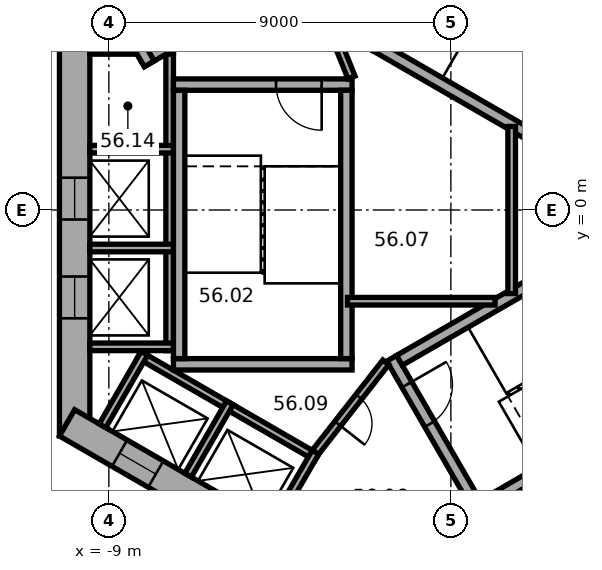
"""IFC4 building model, lengths in metres.
Left out: names, types, materials, properties, quantities, classifications, styles, units other than length and angle.
Written with IfcOpenShell. Run it as: python <this file> out.ifc"""

import sys

from ifc_helpers import new_model, si_unit, direction, frame, frame_2d, origin, place, context, subcontext, project, spatial, rectangle, extrude, element, fill, save


model = new_model("IFC4")
c1 = context("Model", 3, precision=1e-05, world=origin(), true_north=direction((0.0, 1.0)))
c2 = subcontext(c1, "Body", "Model", "MODEL_VIEW")
j1 = project(units=[si_unit("LENGTHUNIT", "METRE"), si_unit("PLANEANGLEUNIT", "RADIAN")], contexts=[c1])
p1 = place(None, origin())
s1 = spatial("IfcSite", under=j1, at=p1, CompositionType="ELEMENT")
p2 = place(p1, origin())
s2 = spatial("IfcBuilding", under=s1, at=p2, CompositionType="ELEMENT")
p3 = place(p2, frame((0.0, 0.0, 229.1)))
s3 = spatial("IfcBuildingStorey", under=s2, at=p3, CompositionType="ELEMENT", Elevation=229.1)
p4 = place(p3, frame((-9.9, 5.947, 0.0), z_axis=(0.0, 0.0, 1.0), x_axis=(0.0, -1.0, 0.0)))
e1 = element("IfcWall", 1, at=p4, inside=s3, PredefinedType="SHEAR", context=c2, shape_type="SweptSolid", body=[
    extrude(rectangle(XDim=11.894, YDim=0.8, at=frame_2d((5.947, 0.0))), origin(), (0.0, 0.0, 1.0), 3.7),
])
p5 = place(p4, frame((5.097, 0.0, 0.0)))
e2 = element("IfcOpeningElement", 2, at=p5, cuts=e1, PredefinedType="OPENING", context=c2, shape_type="SweptSolid", body=[
    extrude(rectangle(XDim=1.1, YDim=2.1, at=frame_2d((0.55, 1.05))), frame((0.0, 0.41, 0.0), z_axis=(0.0, -1.0, 0.0), x_axis=(1.0, 0.0, 0.0)), (0.0, 0.0, 1.0), 0.82),
])
p6 = place(p4, frame((7.697, 0.0, 0.0)))
e3 = element("IfcOpeningElement", 3, at=p6, cuts=e1, PredefinedType="OPENING", context=c2, shape_type="SweptSolid", body=[
    extrude(rectangle(XDim=1.1, YDim=2.1, at=frame_2d((0.55, 1.05))), frame((0.0, 0.41, 0.0), z_axis=(0.0, -1.0, 0.0), x_axis=(1.0, 0.0, 0.0)), (0.0, 0.0, 1.0), 0.82),
])
p7 = place(p3, frame((-10.1, -5.6, 0.0), z_axis=(0.0, 0.0, 1.0), x_axis=(0.866023897231, -0.500002609418, 0.0)))
e4 = element("IfcWall", 4, at=p7, inside=s3, PredefinedType="SHEAR", context=c2, shape_type="SweptSolid", body=[
    extrude(rectangle(XDim=11.894, YDim=0.8, at=frame_2d((5.947, 0.0))), origin(), (0.0, 0.0, 1.0), 3.7),
])
p8 = place(p7, frame((6.147, 0.0, 0.0)))
e5 = element("IfcOpeningElement", 5, at=p8, cuts=e4, PredefinedType="OPENING", context=c2, shape_type="SweptSolid", body=[
    extrude(rectangle(XDim=1.5, YDim=2.1, at=frame_2d((0.75, 1.05))), frame((0.0, 0.41, 0.0), z_axis=(0.0, -1.0, 0.0), x_axis=(1.0, 0.0, 0.0)), (0.0, 0.0, 1.0), 0.82),
])
p9 = place(p7, frame((1.597, 0.0, 0.0)))
e6 = element("IfcOpeningElement", 6, at=p9, cuts=e4, PredefinedType="OPENING", context=c2, shape_type="SweptSolid", body=[
    extrude(rectangle(XDim=1.1, YDim=2.1, at=frame_2d((0.55, 1.05))), frame((0.0, 0.41, 0.0), z_axis=(0.0, -1.0, 0.0), x_axis=(1.0, 0.0, 0.0)), (0.0, 0.0, 1.0), 0.82),
])
p10 = place(p7, frame((4.197, 0.0, 0.0)))
e7 = element("IfcOpeningElement", 7, at=p10, cuts=e4, PredefinedType="OPENING", context=c2, shape_type="SweptSolid", body=[
    extrude(rectangle(XDim=1.1, YDim=2.1, at=frame_2d((0.55, 1.05))), frame((0.0, 0.41, 0.0), z_axis=(0.0, -1.0, 0.0), x_axis=(1.0, 0.0, 0.0)), (0.0, 0.0, 1.0), 0.82),
])
p11 = place(p3, frame((-0.2, -11.547, 0.0), z_axis=(0.0, 0.0, 1.0), x_axis=(0.866023897231, 0.500002609418, 0.0)))
e8 = element("IfcWall", 8, at=p11, inside=s3, PredefinedType="SHEAR", context=c2, shape_type="SweptSolid", body=[
    extrude(rectangle(XDim=11.894, YDim=0.8, at=frame_2d((5.947, 0.0))), origin(), (0.0, 0.0, 1.0), 3.7),
])
p12 = place(p11, frame((2.497, 0.0, 0.0)))
e9 = element("IfcOpeningElement", 9, at=p12, cuts=e8, PredefinedType="OPENING", context=c2, shape_type="SweptSolid", body=[
    extrude(rectangle(XDim=1.1, YDim=2.1, at=frame_2d((0.55, 1.05))), frame((0.0, 0.41, 0.0), z_axis=(0.0, -1.0, 0.0), x_axis=(1.0, 0.0, 0.0)), (0.0, 0.0, 1.0), 0.82),
])
p13 = place(p11, frame((5.097, 0.0, 0.0)))
e10 = element("IfcOpeningElement", 10, at=p13, cuts=e8, PredefinedType="OPENING", context=c2, shape_type="SweptSolid", body=[
    extrude(rectangle(XDim=1.1, YDim=2.1, at=frame_2d((0.55, 1.05))), frame((0.0, 0.41, 0.0), z_axis=(0.0, -1.0, 0.0), x_axis=(1.0, 0.0, 0.0)), (0.0, 0.0, 1.0), 0.82),
])
p14 = place(p11, frame((7.697, 0.0, 0.0)))
e11 = element("IfcOpeningElement", 11, at=p14, cuts=e8, PredefinedType="OPENING", context=c2, shape_type="SweptSolid", body=[
    extrude(rectangle(XDim=1.1, YDim=2.1, at=frame_2d((0.55, 1.05))), frame((0.0, 0.41, 0.0), z_axis=(0.0, -1.0, 0.0), x_axis=(1.0, 0.0, 0.0)), (0.0, 0.0, 1.0), 0.82),
])
p15 = place(p3, frame((-7.4, 4.3, 0.0), z_axis=(0.0, 0.0, 1.0), x_axis=(0.0, -1.0, 0.0)))
e12 = element("IfcWall", 12, at=p15, inside=s3, PredefinedType="PARTITIONING", context=c2, shape_type="SweptSolid", body=[
    extrude(rectangle(XDim=8.0, YDim=0.2, at=frame_2d((4.0, 0.0))), origin(), (0.0, 0.0, 1.0), 3.42),
])
for number, where, z_axis, x_axis in (
    (13, (-7.3, 4.2, 0.0), (0.0, 0.0, 1.0), (-1.0, 0.0, 0.0)),
    (14, (-7.3, 1.6, 0.0), (0.0, 0.0, 1.0), (-1.0, 0.0, 0.0)),
    (15, (-7.3, -1.0, 0.0), (0.0, 0.0, 1.0), (-1.0, 0.0, 0.0)),
    (16, (-7.3, -3.6, 0.0), (0.0, 0.0, 1.0), (-1.0, 0.0, 0.0)),
):
    element("IfcWall", number, at=place(p3, frame(where, z_axis=z_axis, x_axis=x_axis)), inside=s3, PredefinedType="PARTITIONING", context=c2, shape_type="SweptSolid", body=[
        extrude(rectangle(XDim=2.2, YDim=0.2, at=frame_2d((1.1, 0.0))), origin(), (0.0, 0.0, 1.0), 3.42),
    ])
p16 = place(p3, frame((-8.203, -3.809, 0.0), z_axis=(0.0, 0.0, 1.0), x_axis=(0.866028230842, -0.499995103361, 0.0)))
e17 = element("IfcWall", 17, at=p16, inside=s3, PredefinedType="PARTITIONING", context=c2, shape_type="SweptSolid", body=[
    extrude(rectangle(XDim=5.4, YDim=0.2, at=frame_2d((2.7, 0.0))), origin(), (0.0, 0.0, 1.0), 3.42),
])
for number, where, z_axis, x_axis in (
    (18, (-8.067, -3.772, 0.0), (0.0, 0.0, 1.0), (-0.5, -0.866, 0.0)),
    (19, (-5.815, -5.072, 0.0), (0.0, 0.0, 1.0), (-0.5, -0.866, 0.0)),
):
    element("IfcWall", number, at=place(p3, frame(where, z_axis=z_axis, x_axis=x_axis)), inside=s3, PredefinedType="PARTITIONING", context=c2, shape_type="SweptSolid", body=[
        extrude(rectangle(XDim=2.2, YDim=0.2, at=frame_2d((1.1, 0.0))), origin(), (0.0, 0.0, 1.0), 3.42),
    ])
p17 = place(p3, frame((-3.563, -6.372, 0.0), z_axis=(0.0, 0.0, 1.0), x_axis=(-0.499994660107, -0.866028486751, 0.0)))
e20 = element("IfcWall", 20, at=p17, inside=s3, PredefinedType="PARTITIONING", context=c2, shape_type="SweptSolid", body=[
    extrude(rectangle(XDim=2.2, YDim=0.2, at=frame_2d((1.1, 0.0))), origin(), (0.0, 0.0, 1.0), 3.42),
])
p18 = place(p3, frame((-0.024, -8.559, 0.0), z_axis=(0.0, 0.0, 1.0), x_axis=(0.866026010844, 0.49999894854, 0.0)))
e21 = element("IfcWall", 21, at=p18, inside=s3, PredefinedType="PARTITIONING", context=c2, shape_type="SweptSolid", body=[
    extrude(rectangle(XDim=8.0, YDim=0.2, at=frame_2d((4.0, 0.0))), origin(), (0.0, 0.0, 1.0), 3.42),
])
p19 = place(p3, frame((4.103, 0.807, 0.0), z_axis=(0.0, 0.0, 1.0), x_axis=(-0.866027801685, 0.499995846692, 0.0)))
e22 = element("IfcWall", 22, at=p19, inside=s3, PredefinedType="SHEAR", context=c2, shape_type="SweptSolid", body=[
    extrude(rectangle(XDim=7.06, YDim=0.3, at=frame_2d((3.53, 0.0))), origin(), (0.0, 0.0, 1.0), 3.42),
])
p20 = place(p3, frame((-2.6, 3.3, 0.0), z_axis=(0.0, 0.0, 1.0), x_axis=(-1.0, 0.0, 0.0)))
e23 = element("IfcWall", 23, at=p20, inside=s3, PredefinedType="SHEAR", context=c2, shape_type="SweptSolid", body=[
    extrude(rectangle(XDim=4.7, YDim=0.3, at=frame_2d((2.35, 0.0))), origin(), (0.0, 0.0, 1.0), 3.42),
])
p21 = place(p20, frame((0.8, 0.0, 0.0)))
e24 = element("IfcOpeningElement", 24, at=p21, cuts=e23, PredefinedType="OPENING", context=c2, shape_type="SweptSolid", body=[
    extrude(rectangle(XDim=1.2, YDim=2.1, at=frame_2d((0.6, 1.05))), frame((0.0, 0.16, 0.0), z_axis=(0.0, -1.0, 0.0), x_axis=(1.0, 0.0, 0.0)), (0.0, 0.0, 1.0), 0.32),
])
p22 = place(p3, frame((-2.6, -4.06, 0.0), z_axis=(0.0, 0.0, 1.0), x_axis=(-1.0, 0.0, 0.0)))
e25 = element("IfcWall", 25, at=p22, inside=s3, PredefinedType="SHEAR", context=c2, shape_type="SweptSolid", body=[
    extrude(rectangle(XDim=4.7, YDim=0.3, at=frame_2d((2.35, 0.0))), origin(), (0.0, 0.0, 1.0), 3.42),
])
for number, where, z_axis, x_axis in (
    (26, (-2.75, 3.15, 0.0), (0.0, 0.0, 1.0), (0.0, -1.0, 0.0)),
    (27, (-7.15, 3.15, 0.0), (0.0, 0.0, 1.0), (0.0, -1.0, 0.0)),
):
    element("IfcWall", number, at=place(p3, frame(where, z_axis=z_axis, x_axis=x_axis)), inside=s3, PredefinedType="SHEAR", context=c2, shape_type="SweptSolid", body=[
        extrude(rectangle(XDim=7.06, YDim=0.3, at=frame_2d((3.53, 0.0))), origin(), (0.0, 0.0, 1.0), 3.42),
    ])
p23 = place(p3, frame((-1.558, -3.902, 0.0), z_axis=(0.0, 0.0, 1.0), x_axis=(0.499977259774, -0.866038532462, 0.0)))
e28 = element("IfcWall", 28, at=p23, inside=s3, PredefinedType="SHEAR", context=c2, shape_type="SweptSolid", body=[
    extrude(rectangle(XDim=4.7, YDim=0.3, at=frame_2d((2.35, 0.0))), origin(), (0.0, 0.0, 1.0), 3.42),
])
p24 = place(p23, frame((0.8, 0.0, 0.0)))
e29 = element("IfcOpeningElement", 29, at=p24, cuts=e28, PredefinedType="OPENING", context=c2, shape_type="SweptSolid", body=[
    extrude(rectangle(XDim=1.2, YDim=2.1, at=frame_2d((0.6, 1.05))), frame((0.0, 0.16, 0.0), z_axis=(0.0, -1.0, 0.0), x_axis=(1.0, 0.0, 0.0)), (0.0, 0.0, 1.0), 0.32),
])
for number, where, z_axis, x_axis in (
    (30, (-1.353, -3.957, 0.0), (0.0, 0.0, 1.0), (0.866, 0.5, 0.0)),
    (31, (0.847, -7.767, 0.0), (0.0, 0.0, 1.0), (0.866, 0.5, 0.0)),
):
    element("IfcWall", number, at=place(p3, frame(where, z_axis=z_axis, x_axis=x_axis)), inside=s3, PredefinedType="SHEAR", context=c2, shape_type="SweptSolid", body=[
        extrude(rectangle(XDim=7.06, YDim=0.3, at=frame_2d((3.53, 0.0))), origin(), (0.0, 0.0, 1.0), 3.42),
    ])
p25 = place(p3, frame((-5.24, 5.577, 0.0), z_axis=(0.0, 0.0, 1.0), x_axis=(-0.866014461049, -0.500018952895, 0.0)))
e32 = element("IfcWall", 32, at=p25, inside=s3, PredefinedType="SHEAR", context=c2, shape_type="SweptSolid", body=[
    extrude(rectangle(XDim=3.35, YDim=0.3, at=frame_2d((1.675, 0.0))), origin(), (0.0, 0.0, 1.0), 3.42),
])
p26 = place(p3, frame((-7.937, 3.847, 0.0), z_axis=(0.0, 0.0, 1.0), x_axis=(-0.50002983664, 0.866008176907, 0.0)))
e33 = element("IfcWall", 33, at=p26, inside=s3, PredefinedType="SHEAR", context=c2, shape_type="SweptSolid", body=[
    extrude(rectangle(XDim=2.2, YDim=0.3, at=frame_2d((1.1, 0.0))), origin(), (0.0, 0.0, 1.0), 3.42),
])
p27 = place(p3, frame((-2.615, 3.487, 0.0), z_axis=(0.0, 0.0, 1.0), x_axis=(-0.373576831041, 0.92759924068, 0.0)))
e34 = element("IfcWall", 34, at=p27, inside=s3, PredefinedType="PARTITIONING", context=c2, shape_type="SweptSolid", body=[
    extrude(rectangle(XDim=3.002, YDim=0.2, at=frame_2d((1.501, 0.0))), origin(), (0.0, 0.0, 1.0), 3.42),
])
p28 = place(p27, frame((1.15, 0.0, 0.0)))
e35 = element("IfcOpeningElement", 35, at=p28, cuts=e34, PredefinedType="OPENING", context=c2, shape_type="SweptSolid", body=[
    extrude(rectangle(XDim=0.9, YDim=2.1, at=frame_2d((0.45, 1.05))), frame((0.0, 0.11, 0.0), z_axis=(0.0, -1.0, 0.0), x_axis=(1.0, 0.0, 0.0)), (0.0, 0.0, 1.0), 0.22),
])
p29 = place(p3, frame((-1.712, -4.008, 0.0), z_axis=(0.0, 0.0, 1.0), x_axis=(-0.616549420702, -0.787316208287, 0.0)))
e36 = element("IfcWall", 36, at=p29, inside=s3, PredefinedType="PARTITIONING", context=c2, shape_type="SweptSolid", body=[
    extrude(rectangle(XDim=3.002, YDim=0.2, at=frame_2d((1.501, 0.0))), origin(), (0.0, 0.0, 1.0), 3.42),
])
p30 = place(p29, frame((1.15, 0.0, 0.0)))
e37 = element("IfcOpeningElement", 37, at=p30, cuts=e36, PredefinedType="OPENING", context=c2, shape_type="SweptSolid", body=[
    extrude(rectangle(XDim=0.9, YDim=2.1, at=frame_2d((0.45, 1.05))), frame((0.0, 0.11, 0.0), z_axis=(0.0, -1.0, 0.0), x_axis=(1.0, 0.0, 0.0)), (0.0, 0.0, 1.0), 0.22),
])
p31 = place(p3, frame((-2.72, -2.4, 0.0), z_axis=(0.0, 0.0, 1.0), x_axis=(1.0, 0.0, 0.0)))
e38 = element("IfcWall", 38, at=p31, inside=s3, PredefinedType="PARTITIONING", context=c2, shape_type="SweptSolid", body=[
    extrude(rectangle(XDim=3.883, YDim=0.2, at=frame_2d((1.941, 0.0))), origin(), (0.0, 0.0, 1.0), 3.42),
])
p32 = place(p3, frame((1.6, -2.198, 0.0), z_axis=(0.0, 0.0, 1.0), x_axis=(0.0, 1.0, 0.0)))
e39 = element("IfcWall", 39, at=p32, inside=s3, PredefinedType="PARTITIONING", context=c2, shape_type="SweptSolid", body=[
    extrude(rectangle(XDim=4.397, YDim=0.2, at=frame_2d((2.198, 0.0))), origin(), (0.0, 0.0, 1.0), 3.42),
])
p33 = place(p21, origin())
e40 = element("IfcDoor", 40, at=p33, inside=s3, OperationType="SINGLE_SWING_RIGHT", PredefinedType="DOOR", context=c2, shape_type="SweptSolid", body=[
    extrude(rectangle(XDim=1.2, YDim=2.1, at=frame_2d((0.6, 1.05))), frame((0.0, 0.025, 0.0), z_axis=(0.0, -1.0, 0.0), x_axis=(1.0, 0.0, 0.0)), (0.0, 0.0, 1.0), 0.05),
])
fill(e24, e40)
p34 = place(p24, origin())
e41 = element("IfcDoor", 41, at=p34, inside=s3, OperationType="SINGLE_SWING_RIGHT", PredefinedType="DOOR", context=c2, shape_type="SweptSolid", body=[
    extrude(rectangle(XDim=1.2, YDim=2.1, at=frame_2d((0.6, 1.05))), frame((0.0, 0.025, 0.0), z_axis=(0.0, -1.0, 0.0), x_axis=(1.0, 0.0, 0.0)), (0.0, 0.0, 1.0), 0.05),
])
fill(e29, e41)
p35 = place(p30, origin())
e42 = element("IfcDoor", 42, at=p35, inside=s3, OperationType="SINGLE_SWING_LEFT", PredefinedType="DOOR", context=c2, shape_type="SweptSolid", body=[
    extrude(rectangle(XDim=0.9, YDim=2.1, at=frame_2d((0.45, 1.05))), frame((0.0, 0.025, 0.0), z_axis=(0.0, -1.0, 0.0), x_axis=(1.0, 0.0, 0.0)), (0.0, 0.0, 1.0), 0.05),
])
fill(e37, e42)
p36 = place(p5, origin())
e43 = element("IfcDoor", 43, at=p36, inside=s3, OperationType="DOUBLE_DOOR_SLIDING", PredefinedType="DOOR", context=c2, shape_type="SweptSolid", body=[
    extrude(rectangle(XDim=1.1, YDim=2.1, at=frame_2d((0.55, 1.05))), frame((0.0, 0.025, 0.0), z_axis=(0.0, -1.0, 0.0), x_axis=(1.0, 0.0, 0.0)), (0.0, 0.0, 1.0), 0.05),
])
fill(e2, e43)
p37 = place(p6, origin())
e44 = element("IfcDoor", 44, at=p37, inside=s3, OperationType="DOUBLE_DOOR_SLIDING", PredefinedType="DOOR", context=c2, shape_type="SweptSolid", body=[
    extrude(rectangle(XDim=1.1, YDim=2.1, at=frame_2d((0.55, 1.05))), frame((0.0, 0.025, 0.0), z_axis=(0.0, -1.0, 0.0), x_axis=(1.0, 0.0, 0.0)), (0.0, 0.0, 1.0), 0.05),
])
fill(e3, e44)
p38 = place(p9, origin())
e45 = element("IfcDoor", 45, at=p38, inside=s3, OperationType="DOUBLE_DOOR_SLIDING", PredefinedType="DOOR", context=c2, shape_type="SweptSolid", body=[
    extrude(rectangle(XDim=1.1, YDim=2.1, at=frame_2d((0.55, 1.05))), frame((0.0, 0.025, 0.0), z_axis=(0.0, -1.0, 0.0), x_axis=(1.0, 0.0, 0.0)), (0.0, 0.0, 1.0), 0.05),
])
fill(e6, e45)
save(model, sys.argv[1])
